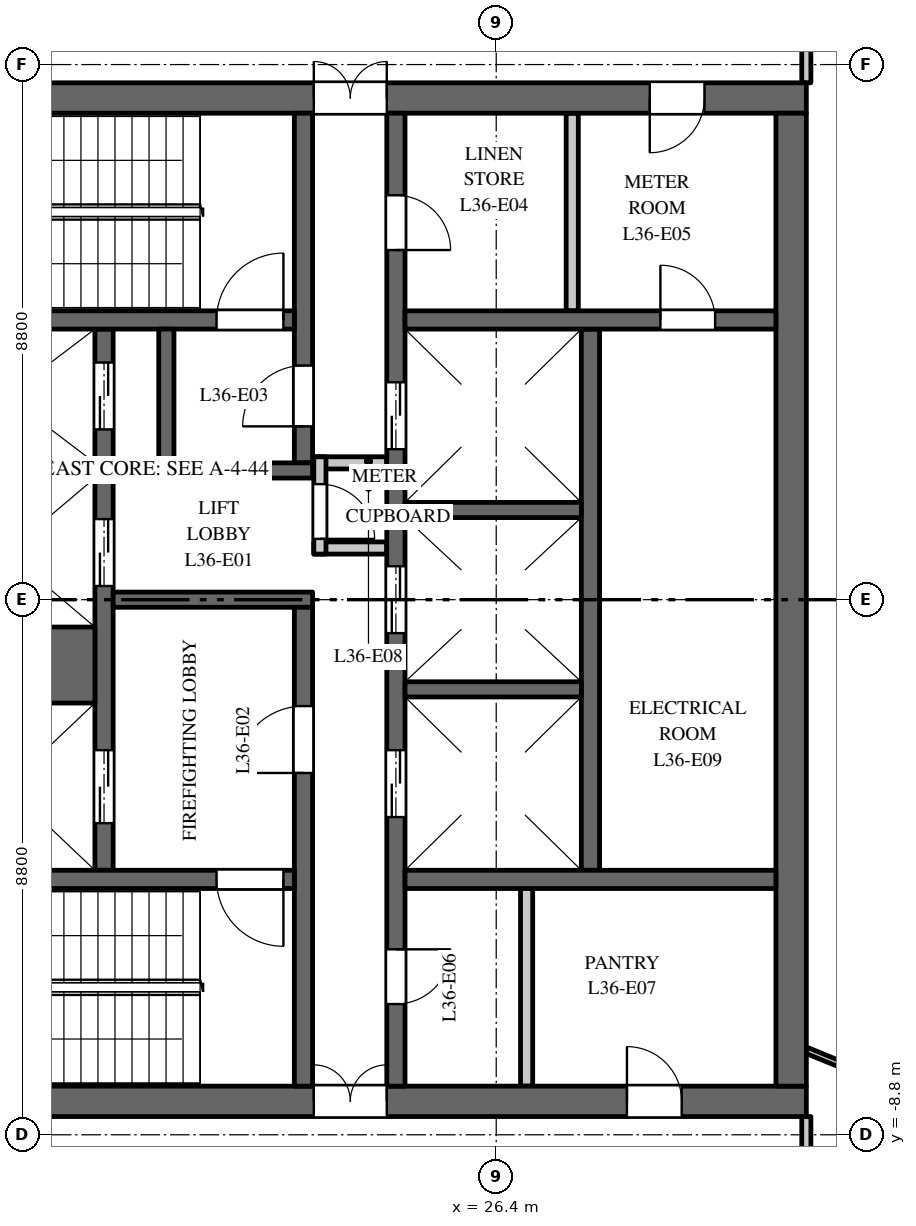
"""IFC4 building model, lengths in metres.
Left out: names, types, materials, properties, quantities, classifications, styles, units other than length and angle.
Written with IfcOpenShell. Run it as: python <this file> out.ifc"""

import sys

from ifc_helpers import new_model, si_unit, direction, frame, frame_2d, origin, place, context, subcontext, project, spatial, rectangle, extrude, element, fill, save


model = new_model("IFC4")
c1 = context("Model", 3, precision=1e-05, world=origin(), true_north=direction((0.0, 1.0)))
c2 = subcontext(c1, "Body", "Model", "MODEL_VIEW")
j1 = project(units=[si_unit("LENGTHUNIT", "METRE"), si_unit("PLANEANGLEUNIT", "RADIAN")], contexts=[c1])
p1 = place(None, origin())
s1 = spatial("IfcSite", under=j1, at=p1, CompositionType="ELEMENT")
p2 = place(p1, origin())
s2 = spatial("IfcBuilding", under=s1, at=p2, CompositionType="ELEMENT")
p3 = place(p2, frame((0.0, 0.0, 158.0)))
s3 = spatial("IfcBuildingStorey", under=s2, at=p3, CompositionType="ELEMENT", Elevation=158.0)
p4 = place(p3, frame((16.5, 8.25, 0.0), z_axis=(0.0, 0.0, 1.0), x_axis=(1.0, 0.0, 0.0)))
e1 = element("IfcWall", 1, at=p4, inside=s3, PredefinedType="SHEAR", context=c2, shape_type="SweptSolid", body=[
    extrude(rectangle(XDim=15.0, YDim=0.5, at=frame_2d((7.5, 0.0))), origin(), (0.0, 0.0, 1.0), 3.7),
])
p5 = place(p4, frame((6.9, 0.0, 0.0)))
e2 = element("IfcOpeningElement", 2, at=p5, cuts=e1, PredefinedType="OPENING", context=c2, shape_type="SweptSolid", body=[
    extrude(rectangle(XDim=1.2, YDim=2.1, at=frame_2d((0.6, 1.05))), frame((0.0, 0.26, 0.0), z_axis=(0.0, -1.0, 0.0), x_axis=(1.0, 0.0, 0.0)), (0.0, 0.0, 1.0), 0.52),
])
p6 = place(p4, frame((12.425, 0.0, 0.0)))
e3 = element("IfcOpeningElement", 3, at=p6, cuts=e1, PredefinedType="OPENING", context=c2, shape_type="SweptSolid", body=[
    extrude(rectangle(XDim=0.9, YDim=2.1, at=frame_2d((0.45, 1.05))), frame((0.0, 0.26, 0.0), z_axis=(0.0, -1.0, 0.0), x_axis=(1.0, 0.0, 0.0)), (0.0, 0.0, 1.0), 0.52),
])
p7 = place(p3, frame((16.5, -8.25, 0.0), z_axis=(0.0, 0.0, 1.0), x_axis=(1.0, 0.0, 0.0)))
e4 = element("IfcWall", 4, at=p7, inside=s3, PredefinedType="SHEAR", context=c2, shape_type="SweptSolid", body=[
    extrude(rectangle(XDim=15.0, YDim=0.5, at=frame_2d((7.5, 0.0))), origin(), (0.0, 0.0, 1.0), 3.7),
])
p8 = place(p7, frame((6.9, 0.0, 0.0)))
e5 = element("IfcOpeningElement", 5, at=p8, cuts=e4, PredefinedType="OPENING", context=c2, shape_type="SweptSolid", body=[
    extrude(rectangle(XDim=1.2, YDim=2.1, at=frame_2d((0.6, 1.05))), frame((0.0, 0.26, 0.0), z_axis=(0.0, -1.0, 0.0), x_axis=(1.0, 0.0, 0.0)), (0.0, 0.0, 1.0), 0.52),
])
p9 = place(p7, frame((12.05, 0.0, 0.0)))
e6 = element("IfcOpeningElement", 6, at=p9, cuts=e4, PredefinedType="OPENING", context=c2, shape_type="SweptSolid", body=[
    extrude(rectangle(XDim=0.9, YDim=2.1, at=frame_2d((0.45, 1.05))), frame((0.0, 0.26, 0.0), z_axis=(0.0, -1.0, 0.0), x_axis=(1.0, 0.0, 0.0)), (0.0, 0.0, 1.0), 0.52),
])
p10 = place(p3, frame((27.95, -4.45, 0.0), z_axis=(0.0, 0.0, 1.0), x_axis=(0.0, 1.0, 0.0)))
e7 = element("IfcWall", 7, at=p10, inside=s3, PredefinedType="SHEAR", context=c2, shape_type="SweptSolid", body=[
    extrude(rectangle(XDim=8.9, YDim=0.3, at=frame_2d((4.45, 0.0))), origin(), (0.0, 0.0, 1.0), 3.7),
])
p11 = place(p3, frame((19.95, -4.45, 0.0), z_axis=(0.0, 0.0, 1.0), x_axis=(0.0, 1.0, 0.0)))
e8 = element("IfcWall", 8, at=p11, inside=s3, PredefinedType="SHEAR", context=c2, shape_type="SweptSolid", body=[
    extrude(rectangle(XDim=8.9, YDim=0.3, at=frame_2d((4.45, 0.0))), origin(), (0.0, 0.0, 1.0), 3.7),
])
p12 = place(p11, frame((0.775, 0.0, 0.0)))
e9 = element("IfcOpeningElement", 9, at=p12, cuts=e8, PredefinedType="OPENING", context=c2, shape_type="SweptSolid", body=[
    extrude(rectangle(XDim=1.2, YDim=2.1, at=frame_2d((0.6, 1.05))), frame((0.0, 0.16, 0.0), z_axis=(0.0, -1.0, 0.0), x_axis=(1.0, 0.0, 0.0)), (0.0, 0.0, 1.0), 0.32),
])
p13 = place(p11, frame((4.675, 0.0, 0.0)))
e10 = element("IfcOpeningElement", 10, at=p13, cuts=e8, PredefinedType="OPENING", context=c2, shape_type="SweptSolid", body=[
    extrude(rectangle(XDim=1.1, YDim=2.1, at=frame_2d((0.55, 1.05))), frame((0.0, 0.16, 0.0), z_axis=(0.0, -1.0, 0.0), x_axis=(1.0, 0.0, 0.0)), (0.0, 0.0, 1.0), 0.32),
])
p14 = place(p11, frame((7.25, 0.0, 0.0)))
e11 = element("IfcOpeningElement", 11, at=p14, cuts=e8, PredefinedType="OPENING", context=c2, shape_type="SweptSolid", body=[
    extrude(rectangle(XDim=1.1, YDim=2.1, at=frame_2d((0.55, 1.05))), frame((0.0, 0.16, 0.0), z_axis=(0.0, -1.0, 0.0), x_axis=(1.0, 0.0, 0.0)), (0.0, 0.0, 1.0), 0.32),
])
p15 = place(p3, frame((24.75, -8.0, 0.0), z_axis=(0.0, 0.0, 1.0), x_axis=(0.0, 1.0, 0.0)))
e12 = element("IfcWall", 12, at=p15, inside=s3, PredefinedType="SHEAR", context=c2, shape_type="SweptSolid", body=[
    extrude(rectangle(XDim=16.0, YDim=0.3, at=frame_2d((8.0, 0.0))), origin(), (0.0, 0.0, 1.0), 3.7),
])
p16 = place(p15, frame((4.425, 0.0, 0.0)))
e13 = element("IfcOpeningElement", 13, at=p16, cuts=e12, PredefinedType="OPENING", context=c2, shape_type="SweptSolid", body=[
    extrude(rectangle(XDim=1.1, YDim=2.1, at=frame_2d((0.55, 1.05))), frame((0.0, 0.16, 0.0), z_axis=(0.0, -1.0, 0.0), x_axis=(1.0, 0.0, 0.0)), (0.0, 0.0, 1.0), 0.32),
])
p17 = place(p15, frame((7.45, 0.0, 0.0)))
e14 = element("IfcOpeningElement", 14, at=p17, cuts=e12, PredefinedType="OPENING", context=c2, shape_type="SweptSolid", body=[
    extrude(rectangle(XDim=1.1, YDim=2.1, at=frame_2d((0.55, 1.05))), frame((0.0, 0.16, 0.0), z_axis=(0.0, -1.0, 0.0), x_axis=(1.0, 0.0, 0.0)), (0.0, 0.0, 1.0), 0.32),
])
p18 = place(p15, frame((10.475, 0.0, 0.0)))
e15 = element("IfcOpeningElement", 15, at=p18, cuts=e12, PredefinedType="OPENING", context=c2, shape_type="SweptSolid", body=[
    extrude(rectangle(XDim=1.1, YDim=2.1, at=frame_2d((0.55, 1.05))), frame((0.0, 0.16, 0.0), z_axis=(0.0, -1.0, 0.0), x_axis=(1.0, 0.0, 0.0)), (0.0, 0.0, 1.0), 0.32),
])
p19 = place(p15, frame((13.75, 0.0, 0.0)))
e16 = element("IfcOpeningElement", 16, at=p19, cuts=e12, PredefinedType="OPENING", context=c2, shape_type="SweptSolid", body=[
    extrude(rectangle(XDim=0.9, YDim=2.1, at=frame_2d((0.45, 1.05))), frame((0.0, 0.16, 0.0), z_axis=(0.0, -1.0, 0.0), x_axis=(1.0, 0.0, 0.0)), (0.0, 0.0, 1.0), 0.32),
])
p20 = place(p15, frame((1.35, 0.0, 0.0)))
e17 = element("IfcOpeningElement", 17, at=p20, cuts=e12, PredefinedType="OPENING", context=c2, shape_type="SweptSolid", body=[
    extrude(rectangle(XDim=0.9, YDim=2.1, at=frame_2d((0.45, 1.05))), frame((0.0, 0.16, 0.0), z_axis=(0.0, -1.0, 0.0), x_axis=(1.0, 0.0, 0.0)), (0.0, 0.0, 1.0), 0.32),
])
p21 = place(p3, frame((20.1, 0.0, 0.0), z_axis=(0.0, 0.0, 1.0), x_axis=(1.0, 0.0, 0.0)))
e18 = element("IfcWall", 18, at=p21, inside=s3, PredefinedType="SHEAR", context=c2, shape_type="SweptSolid", body=[
    extrude(rectangle(XDim=3.28, YDim=0.25, at=frame_2d((1.64, 0.0))), origin(), (0.0, 0.0, 1.0), 3.7),
])
for number, where, z_axis, x_axis in (
    (19, (23.4, 0.85, 0.0), (0.0, 0.0, 1.0), (1.0, 0.0, 0.0)),
    (20, (23.4, 2.25, 0.0), (0.0, 0.0, 1.0), (1.0, 0.0, 0.0)),
):
    element("IfcWall", number, at=place(p3, frame(where, z_axis=z_axis, x_axis=x_axis)), inside=s3, PredefinedType="PARTITIONING", context=c2, shape_type="SweptSolid", body=[
        extrude(rectangle(XDim=1.2, YDim=0.2, at=frame_2d((0.6, 0.0))), origin(), (0.0, 0.0, 1.0), 3.7),
    ])
p22 = place(p3, frame((23.5, 0.75, 0.0), z_axis=(0.0, 0.0, 1.0), x_axis=(0.0, 1.0, 0.0)))
e21 = element("IfcWall", 21, at=p22, inside=s3, PredefinedType="PARTITIONING", context=c2, shape_type="SweptSolid", body=[
    extrude(rectangle(XDim=1.6, YDim=0.2, at=frame_2d((0.8, 0.0))), origin(), (0.0, 0.0, 1.0), 3.7),
])
p23 = place(p22, frame((0.25, 0.0, 0.0)))
e22 = element("IfcOpeningElement", 22, at=p23, cuts=e21, PredefinedType="OPENING", context=c2, shape_type="SweptSolid", body=[
    extrude(rectangle(XDim=0.9, YDim=2.1, at=frame_2d((0.45, 1.05))), frame((0.0, 0.11, 0.0), z_axis=(0.0, -1.0, 0.0), x_axis=(1.0, 0.0, 0.0)), (0.0, 0.0, 1.0), 0.22),
])
p24 = place(p3, frame((31.25, -8.0, 0.0), z_axis=(0.0, 0.0, 1.0), x_axis=(0.0, 1.0, 0.0)))
e23 = element("IfcWall", 23, at=p24, inside=s3, PredefinedType="SHEAR", context=c2, shape_type="SweptSolid", body=[
    extrude(rectangle(XDim=16.0, YDim=0.5, at=frame_2d((8.0, 0.0))), origin(), (0.0, 0.0, 1.0), 3.7),
])
p25 = place(p3, frame((24.9, 4.6, 0.0), z_axis=(0.0, 0.0, 1.0), x_axis=(1.0, 0.0, 0.0)))
e24 = element("IfcWall", 24, at=p25, inside=s3, PredefinedType="SHEAR", context=c2, shape_type="SweptSolid", body=[
    extrude(rectangle(XDim=6.1, YDim=0.3, at=frame_2d((3.05, 0.0))), origin(), (0.0, 0.0, 1.0), 3.7),
])
p26 = place(p25, frame((4.2, 0.0, 0.0)))
e25 = element("IfcOpeningElement", 25, at=p26, cuts=e24, PredefinedType="OPENING", context=c2, shape_type="SweptSolid", body=[
    extrude(rectangle(XDim=0.9, YDim=2.1, at=frame_2d((0.45, 1.05))), frame((0.0, 0.16, 0.0), z_axis=(0.0, -1.0, 0.0), x_axis=(1.0, 0.0, 0.0)), (0.0, 0.0, 1.0), 0.32),
])
for number, where, z_axis, x_axis in (
    (26, (27.65, 4.75, 0.0), (0.0, 0.0, 1.0), (0.0, 1.0, 0.0)),
    (27, (26.9, -8.0, 0.0), (0.0, 0.0, 1.0), (0.0, 1.0, 0.0)),
):
    element("IfcWall", number, at=place(p3, frame(where, z_axis=z_axis, x_axis=x_axis)), inside=s3, PredefinedType="PARTITIONING", context=c2, shape_type="SweptSolid", body=[
        extrude(rectangle(XDim=3.25, YDim=0.2, at=frame_2d((1.625, 0.0))), origin(), (0.0, 0.0, 1.0), 3.7),
    ])
p27 = place(p3, frame((24.9, -4.6, 0.0), z_axis=(0.0, 0.0, 1.0), x_axis=(1.0, 0.0, 0.0)))
e28 = element("IfcWall", 28, at=p27, inside=s3, PredefinedType="SHEAR", context=c2, shape_type="SweptSolid", body=[
    extrude(rectangle(XDim=6.1, YDim=0.3, at=frame_2d((3.05, 0.0))), origin(), (0.0, 0.0, 1.0), 3.7),
])
p28 = place(p3, frame((16.9, -1.075, 0.0), z_axis=(0.0, 0.0, 1.0), x_axis=(1.0, 0.0, 0.0)))
e29 = element("IfcWall", 29, at=p28, inside=s3, PredefinedType="SHEAR", context=c2, shape_type="SweptSolid", body=[
    extrude(rectangle(XDim=2.9, YDim=1.25, at=frame_2d((1.45, 0.0))), origin(), (0.0, 0.0, 1.0), 3.7),
])
for number, where, z_axis, x_axis in (
    (30, (16.9, 2.125, 0.0), (0.0, 0.0, 1.0), (1.0, 0.0, 0.0)),
    (31, (24.9, -1.475, 0.0), (0.0, 0.0, 1.0), (1.0, 0.0, 0.0)),
    (32, (24.9, 1.475, 0.0), (0.0, 0.0, 1.0), (1.0, 0.0, 0.0)),
):
    element("IfcWall", number, at=place(p3, frame(where, z_axis=z_axis, x_axis=x_axis)), inside=s3, PredefinedType="SHEAR", context=c2, shape_type="SweptSolid", body=[
        extrude(rectangle(XDim=2.9, YDim=0.25, at=frame_2d((1.45, 0.0))), origin(), (0.0, 0.0, 1.0), 3.7),
    ])
p29 = place(p3, frame((23.23, 2.25, 0.0), z_axis=(0.0, 0.0, 1.0), x_axis=(0.0, 1.0, 0.0)))
e33 = element("IfcWall", 33, at=p29, inside=s3, PredefinedType="SHEAR", context=c2, shape_type="SweptSolid", body=[
    extrude(rectangle(XDim=5.75, YDim=0.3, at=frame_2d((2.875, 0.0))), origin(), (0.0, 0.0, 1.0), 3.7),
])
p30 = place(p29, frame((0.6, 0.0, 0.0)))
e34 = element("IfcOpeningElement", 34, at=p30, cuts=e33, PredefinedType="OPENING", context=c2, shape_type="SweptSolid", body=[
    extrude(rectangle(XDim=1.0, YDim=2.1, at=frame_2d((0.5, 1.05))), frame((0.0, 0.16, 0.0), z_axis=(0.0, -1.0, 0.0), x_axis=(1.0, 0.0, 0.0)), (0.0, 0.0, 1.0), 0.32),
])
p31 = place(p3, frame((23.23, -8.0, 0.0), z_axis=(0.0, 0.0, 1.0), x_axis=(0.0, 1.0, 0.0)))
e35 = element("IfcWall", 35, at=p31, inside=s3, PredefinedType="SHEAR", context=c2, shape_type="SweptSolid", body=[
    extrude(rectangle(XDim=7.875, YDim=0.3, at=frame_2d((3.938, 0.0))), origin(), (0.0, 0.0, 1.0), 3.7),
])
p32 = place(p31, frame((5.15, 0.0, 0.0)))
e36 = element("IfcOpeningElement", 36, at=p32, cuts=e35, PredefinedType="OPENING", context=c2, shape_type="SweptSolid", body=[
    extrude(rectangle(XDim=1.1, YDim=2.1, at=frame_2d((0.55, 1.05))), frame((0.0, 0.16, 0.0), z_axis=(0.0, -1.0, 0.0), x_axis=(1.0, 0.0, 0.0)), (0.0, 0.0, 1.0), 0.32),
])
p33 = place(p3, frame((16.9, 4.6, 0.0), z_axis=(0.0, 0.0, 1.0), x_axis=(1.0, 0.0, 0.0)))
e37 = element("IfcWall", 37, at=p33, inside=s3, PredefinedType="SHEAR", context=c2, shape_type="SweptSolid", body=[
    extrude(rectangle(XDim=6.18, YDim=0.3, at=frame_2d((3.09, 0.0))), origin(), (0.0, 0.0, 1.0), 3.7),
])
p34 = place(p33, frame((4.9, 0.0, 0.0)))
e38 = element("IfcOpeningElement", 38, at=p34, cuts=e37, PredefinedType="OPENING", context=c2, shape_type="SweptSolid", body=[
    extrude(rectangle(XDim=1.1, YDim=2.1, at=frame_2d((0.55, 1.05))), frame((0.0, 0.16, 0.0), z_axis=(0.0, -1.0, 0.0), x_axis=(1.0, 0.0, 0.0)), (0.0, 0.0, 1.0), 0.32),
])
p35 = place(p3, frame((16.9, -4.6, 0.0), z_axis=(0.0, 0.0, 1.0), x_axis=(1.0, 0.0, 0.0)))
e39 = element("IfcWall", 39, at=p35, inside=s3, PredefinedType="SHEAR", context=c2, shape_type="SweptSolid", body=[
    extrude(rectangle(XDim=6.18, YDim=0.3, at=frame_2d((3.09, 0.0))), origin(), (0.0, 0.0, 1.0), 3.7),
])
p36 = place(p35, frame((4.9, 0.0, 0.0)))
e40 = element("IfcOpeningElement", 40, at=p36, cuts=e39, PredefinedType="OPENING", context=c2, shape_type="SweptSolid", body=[
    extrude(rectangle(XDim=1.1, YDim=2.1, at=frame_2d((0.55, 1.05))), frame((0.0, 0.16, 0.0), z_axis=(0.0, -1.0, 0.0), x_axis=(1.0, 0.0, 0.0)), (0.0, 0.0, 1.0), 0.32),
])
p37 = place(p3, frame((20.85, 2.125, 0.0), z_axis=(0.0, 0.0, 1.0), x_axis=(1.0, 0.0, 0.0)))
e41 = element("IfcWall", 41, at=p37, inside=s3, PredefinedType="SHEAR", context=c2, shape_type="SweptSolid", body=[
    extrude(rectangle(XDim=2.53, YDim=0.25, at=frame_2d((1.265, 0.0))), origin(), (0.0, 0.0, 1.0), 3.7),
])
p38 = place(p3, frame((20.975, 2.25, 0.0), z_axis=(0.0, 0.0, 1.0), x_axis=(0.0, 1.0, 0.0)))
e42 = element("IfcWall", 42, at=p38, inside=s3, PredefinedType="SHEAR", context=c2, shape_type="SweptSolid", body=[
    extrude(rectangle(XDim=2.2, YDim=0.25, at=frame_2d((1.1, 0.0))), origin(), (0.0, 0.0, 1.0), 3.7),
])
p39 = place(p3, frame((31.5, -10.7, 0.0), z_axis=(0.0, 0.0, 1.0), x_axis=(0.0, 1.0, 0.0)))
e43 = element("IfcWall", 43, at=p39, inside=s3, PredefinedType="PARTITIONING", context=c2, shape_type="SweptSolid", body=[
    extrude(rectangle(XDim=2.2, YDim=0.15, at=frame_2d((1.1, 0.0))), origin(), (0.0, 0.0, 1.0), 2.9),
])
p40 = place(p3, frame((31.5, -7.41, 0.0), z_axis=(0.0, 0.0, 1.0), x_axis=(0.925344112436, -0.379128307542, 0.0)))
e44 = element("IfcWall", 44, at=p40, inside=s3, PredefinedType="PARTITIONING", context=c2, shape_type="SweptSolid", body=[
    extrude(rectangle(XDim=2.954, YDim=0.1, at=frame_2d((1.477, 0.0))), origin(), (0.0, 0.0, 1.0), 3.7),
])
p41 = place(p3, frame((31.5, 8.5, 0.0), z_axis=(0.0, 0.0, 1.0), x_axis=(0.0, 1.0, 0.0)))
e45 = element("IfcWall", 45, at=p41, inside=s3, PredefinedType="PARTITIONING", context=c2, shape_type="SweptSolid", body=[
    extrude(rectangle(XDim=2.2, YDim=0.15, at=frame_2d((1.1, 0.0))), origin(), (0.0, 0.0, 1.0), 2.9),
])
p42 = place(p12, origin())
e46 = element("IfcDoor", 46, at=p42, inside=s3, OperationType="DOUBLE_DOOR_SLIDING", PredefinedType="DOOR", context=c2, shape_type="SweptSolid", body=[
    extrude(rectangle(XDim=1.2, YDim=2.1, at=frame_2d((0.6, 1.05))), frame((0.0, 0.025, 0.0), z_axis=(0.0, -1.0, 0.0), x_axis=(1.0, 0.0, 0.0)), (0.0, 0.0, 1.0), 0.05),
])
fill(e9, e46)
p43 = place(p13, origin())
e47 = element("IfcDoor", 47, at=p43, inside=s3, OperationType="DOUBLE_DOOR_SLIDING", PredefinedType="DOOR", context=c2, shape_type="SweptSolid", body=[
    extrude(rectangle(XDim=1.1, YDim=2.1, at=frame_2d((0.55, 1.05))), frame((0.0, 0.025, 0.0), z_axis=(0.0, -1.0, 0.0), x_axis=(1.0, 0.0, 0.0)), (0.0, 0.0, 1.0), 0.05),
])
fill(e10, e47)
p44 = place(p14, origin())
e48 = element("IfcDoor", 48, at=p44, inside=s3, OperationType="DOUBLE_DOOR_SLIDING", PredefinedType="DOOR", context=c2, shape_type="SweptSolid", body=[
    extrude(rectangle(XDim=1.1, YDim=2.1, at=frame_2d((0.55, 1.05))), frame((0.0, 0.025, 0.0), z_axis=(0.0, -1.0, 0.0), x_axis=(1.0, 0.0, 0.0)), (0.0, 0.0, 1.0), 0.05),
])
fill(e11, e48)
p45 = place(p16, origin())
e49 = element("IfcDoor", 49, at=p45, inside=s3, OperationType="DOUBLE_DOOR_SLIDING", PredefinedType="DOOR", context=c2, shape_type="SweptSolid", body=[
    extrude(rectangle(XDim=1.1, YDim=2.1, at=frame_2d((0.55, 1.05))), frame((0.0, 0.025, 0.0), z_axis=(0.0, -1.0, 0.0), x_axis=(1.0, 0.0, 0.0)), (0.0, 0.0, 1.0), 0.05),
])
fill(e13, e49)
p46 = place(p17, origin())
e50 = element("IfcDoor", 50, at=p46, inside=s3, OperationType="DOUBLE_DOOR_SLIDING", PredefinedType="DOOR", context=c2, shape_type="SweptSolid", body=[
    extrude(rectangle(XDim=1.1, YDim=2.1, at=frame_2d((0.55, 1.05))), frame((0.0, 0.025, 0.0), z_axis=(0.0, -1.0, 0.0), x_axis=(1.0, 0.0, 0.0)), (0.0, 0.0, 1.0), 0.05),
])
fill(e14, e50)
p47 = place(p18, origin())
e51 = element("IfcDoor", 51, at=p47, inside=s3, OperationType="DOUBLE_DOOR_SLIDING", PredefinedType="DOOR", context=c2, shape_type="SweptSolid", body=[
    extrude(rectangle(XDim=1.1, YDim=2.1, at=frame_2d((0.55, 1.05))), frame((0.0, 0.025, 0.0), z_axis=(0.0, -1.0, 0.0), x_axis=(1.0, 0.0, 0.0)), (0.0, 0.0, 1.0), 0.05),
])
fill(e15, e51)
p48 = place(p34, origin())
e52 = element("IfcDoor", 52, at=p48, inside=s3, OperationType="SINGLE_SWING_LEFT", PredefinedType="DOOR", context=c2, shape_type="SweptSolid", body=[
    extrude(rectangle(XDim=1.1, YDim=2.1, at=frame_2d((0.55, 1.05))), frame((0.0, 0.025, 0.0), z_axis=(0.0, -1.0, 0.0), x_axis=(1.0, 0.0, 0.0)), (0.0, 0.0, 1.0), 0.05),
])
fill(e38, e52)
p49 = place(p36, origin())
e53 = element("IfcDoor", 53, at=p49, inside=s3, OperationType="SINGLE_SWING_RIGHT", PredefinedType="DOOR", context=c2, shape_type="SweptSolid", body=[
    extrude(rectangle(XDim=1.1, YDim=2.1, at=frame_2d((0.55, 1.05))), frame((0.0, 0.025, 0.0), z_axis=(0.0, -1.0, 0.0), x_axis=(1.0, 0.0, 0.0)), (0.0, 0.0, 1.0), 0.05),
])
fill(e40, e53)
p50 = place(p32, origin())
e54 = element("IfcDoor", 54, at=p50, inside=s3, OperationType="SINGLE_SWING_RIGHT", PredefinedType="DOOR", context=c2, shape_type="SweptSolid", body=[
    extrude(rectangle(XDim=1.1, YDim=2.1, at=frame_2d((0.55, 1.05))), frame((0.0, 0.025, 0.0), z_axis=(0.0, -1.0, 0.0), x_axis=(1.0, 0.0, 0.0)), (0.0, 0.0, 1.0), 0.05),
])
fill(e36, e54)
p51 = place(p30, origin())
e55 = element("IfcDoor", 55, at=p51, inside=s3, OperationType="SINGLE_SWING_RIGHT", PredefinedType="DOOR", context=c2, shape_type="SweptSolid", body=[
    extrude(rectangle(XDim=1.0, YDim=2.1, at=frame_2d((0.5, 1.05))), frame((0.0, 0.025, 0.0), z_axis=(0.0, -1.0, 0.0), x_axis=(1.0, 0.0, 0.0)), (0.0, 0.0, 1.0), 0.05),
])
fill(e34, e55)
p52 = place(p5, origin())
e56 = element("IfcDoor", 56, at=p52, inside=s3, OperationType="DOUBLE_DOOR_DOUBLE_SWING", PredefinedType="DOOR", context=c2, shape_type="SweptSolid", body=[
    extrude(rectangle(XDim=1.2, YDim=2.1, at=frame_2d((0.6, 1.05))), frame((0.0, 0.025, 0.0), z_axis=(0.0, -1.0, 0.0), x_axis=(1.0, 0.0, 0.0)), (0.0, 0.0, 1.0), 0.05),
])
fill(e2, e56)
p53 = place(p8, origin())
e57 = element("IfcDoor", 57, at=p53, inside=s3, OperationType="DOUBLE_DOOR_DOUBLE_SWING", PredefinedType="DOOR", context=c2, shape_type="SweptSolid", body=[
    extrude(rectangle(XDim=1.2, YDim=2.1, at=frame_2d((0.6, 1.05))), frame((0.0, 0.025, 0.0), z_axis=(0.0, -1.0, 0.0), x_axis=(1.0, 0.0, 0.0)), (0.0, 0.0, 1.0), 0.05),
])
fill(e5, e57)
p54 = place(p19, origin())
e58 = element("IfcDoor", 58, at=p54, inside=s3, OperationType="SINGLE_SWING_LEFT", PredefinedType="DOOR", context=c2, shape_type="SweptSolid", body=[
    extrude(rectangle(XDim=0.9, YDim=2.1, at=frame_2d((0.45, 1.05))), frame((0.0, 0.025, 0.0), z_axis=(0.0, -1.0, 0.0), x_axis=(1.0, 0.0, 0.0)), (0.0, 0.0, 1.0), 0.05),
])
fill(e16, e58)
p55 = place(p6, origin())
e59 = element("IfcDoor", 59, at=p55, inside=s3, OperationType="SINGLE_SWING_LEFT", PredefinedType="DOOR", context=c2, shape_type="SweptSolid", body=[
    extrude(rectangle(XDim=0.9, YDim=2.1, at=frame_2d((0.45, 1.05))), frame((0.0, 0.025, 0.0), z_axis=(0.0, -1.0, 0.0), x_axis=(1.0, 0.0, 0.0)), (0.0, 0.0, 1.0), 0.05),
])
fill(e3, e59)
p56 = place(p20, origin())
e60 = element("IfcDoor", 60, at=p56, inside=s3, OperationType="SINGLE_SWING_RIGHT", PredefinedType="DOOR", context=c2, shape_type="SweptSolid", body=[
    extrude(rectangle(XDim=0.9, YDim=2.1, at=frame_2d((0.45, 1.05))), frame((0.0, 0.025, 0.0), z_axis=(0.0, -1.0, 0.0), x_axis=(1.0, 0.0, 0.0)), (0.0, 0.0, 1.0), 0.05),
])
fill(e17, e60)
p57 = place(p9, origin())
e61 = element("IfcDoor", 61, at=p57, inside=s3, OperationType="SINGLE_SWING_RIGHT", PredefinedType="DOOR", context=c2, shape_type="SweptSolid", body=[
    extrude(rectangle(XDim=0.9, YDim=2.1, at=frame_2d((0.45, 1.05))), frame((0.0, 0.025, 0.0), z_axis=(0.0, -1.0, 0.0), x_axis=(1.0, 0.0, 0.0)), (0.0, 0.0, 1.0), 0.05),
])
fill(e6, e61)
p58 = place(p23, origin())
e62 = element("IfcDoor", 62, at=p58, inside=s3, OperationType="SINGLE_SWING_LEFT", PredefinedType="DOOR", context=c2, shape_type="SweptSolid", body=[
    extrude(rectangle(XDim=0.9, YDim=2.1, at=frame_2d((0.45, 1.05))), frame((0.0, 0.025, 0.0), z_axis=(0.0, -1.0, 0.0), x_axis=(1.0, 0.0, 0.0)), (0.0, 0.0, 1.0), 0.05),
])
fill(e22, e62)
p59 = place(p26, origin())
e63 = element("IfcDoor", 63, at=p59, inside=s3, OperationType="SINGLE_SWING_RIGHT", PredefinedType="DOOR", context=c2, shape_type="SweptSolid", body=[
    extrude(rectangle(XDim=0.9, YDim=2.1, at=frame_2d((0.45, 1.05))), frame((0.0, 0.025, 0.0), z_axis=(0.0, -1.0, 0.0), x_axis=(1.0, 0.0, 0.0)), (0.0, 0.0, 1.0), 0.05),
])
fill(e25, e63)
save(model, sys.argv[1])
